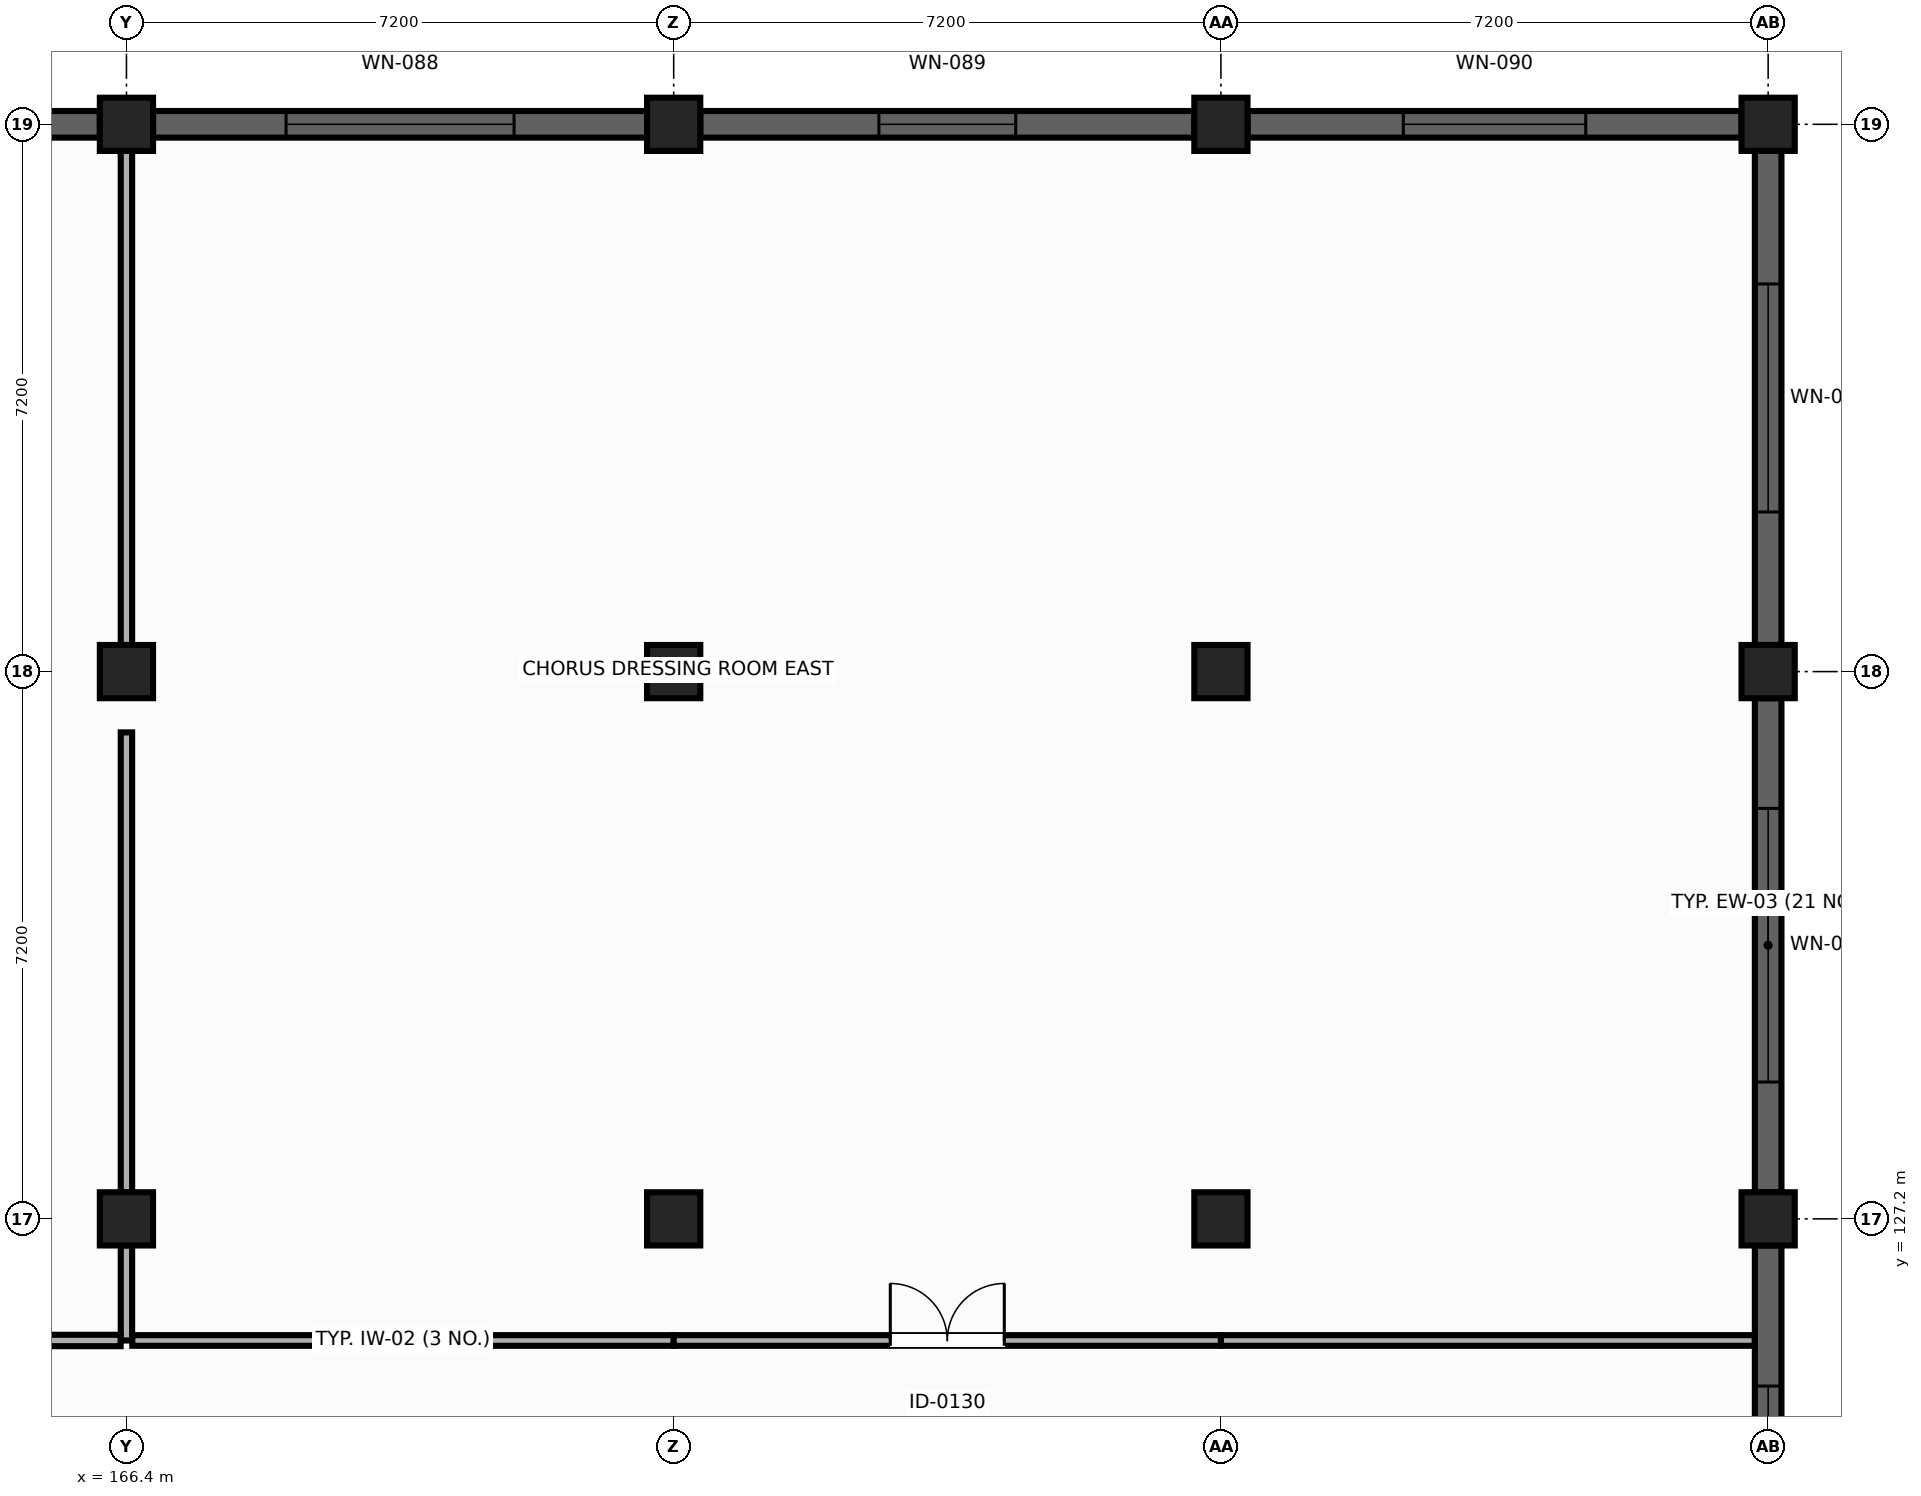
"""IFC4 building model, lengths in metres.
Left out: names, types, materials, properties, quantities, classifications, styles, units other than length and angle.
Written with IfcOpenShell. Run it as: python <this file> out.ifc"""

import sys

from ifc_helpers import new_model, si_unit, direction, frame, frame_2d, origin, origin_2d, place, context, subcontext, project, spatial, rectangle, extrude, element, fill, save


model = new_model("IFC4")
c1 = context("Model", 3, precision=1e-05, world=origin(), true_north=direction((0.0, 1.0)))
c2 = subcontext(c1, "Body", "Model", "MODEL_VIEW")
j1 = project(units=[si_unit("LENGTHUNIT", "METRE"), si_unit("PLANEANGLEUNIT", "RADIAN")], contexts=[c1])
p1 = place(None, origin())
s1 = spatial("IfcSite", under=j1, at=p1, CompositionType="ELEMENT")
p2 = place(p1, origin())
s2 = spatial("IfcBuilding", under=s1, at=p2, CompositionType="ELEMENT")
p3 = place(p2, frame((0.0, 0.0, 5.4)))
s3 = spatial("IfcBuildingStorey", under=s2, at=p3, CompositionType="ELEMENT", Elevation=5.4)
for number, where, z_axis, x_axis in (
    (1, (166.4, 127.2, 0.0), (0.0, 0.0, 1.0), (0.0, 1.0, 0.0)),
    (2, (173.6, 127.2, 0.0), (0.0, 0.0, 1.0), (1.0, 0.0, 0.0)),
    (3, (180.8, 127.2, 0.0), (0.0, 0.0, 1.0), (1.0, 0.0, 0.0)),
):
    element("IfcColumn", number, at=place(p3, frame(where, z_axis=z_axis, x_axis=x_axis)), inside=s3, PredefinedType="COLUMN", context=c2, shape_type="SweptSolid", body=[
        extrude(rectangle(XDim=0.7, YDim=0.7, at=origin_2d()), origin(), (0.0, 0.0, 1.0), 4.5),
    ])
p4 = place(p3, frame((188.0, 127.2, 0.0), z_axis=(0.0, 0.0, 1.0), x_axis=(0.0, 1.0, 0.0)))
e4 = element("IfcColumn", 4, at=p4, inside=s3, PredefinedType="COLUMN", context=c2, shape_type="SweptSolid", body=[
    extrude(rectangle(XDim=0.7, YDim=0.7, at=origin_2d()), origin(), (0.0, 0.0, 1.0), 4.346),
])
for number, where, z_axis, x_axis in (
    (5, (166.4, 134.4, 0.0), (0.0, 0.0, 1.0), (1.0, 0.0, 0.0)),
    (6, (173.6, 134.4, 0.0), (0.0, 0.0, 1.0), (1.0, 0.0, 0.0)),
    (7, (180.8, 134.4, 0.0), (0.0, 0.0, 1.0), (0.0, 1.0, 0.0)),
):
    element("IfcColumn", number, at=place(p3, frame(where, z_axis=z_axis, x_axis=x_axis)), inside=s3, PredefinedType="COLUMN", context=c2, shape_type="SweptSolid", body=[
        extrude(rectangle(XDim=0.7, YDim=0.7, at=origin_2d()), origin(), (0.0, 0.0, 1.0), 4.5),
    ])
p5 = place(p3, frame((188.0, 134.4, 0.0), z_axis=(0.0, 0.0, 1.0), x_axis=(1.0, 0.0, 0.0)))
e8 = element("IfcColumn", 8, at=p5, inside=s3, PredefinedType="COLUMN", context=c2, shape_type="SweptSolid", body=[
    extrude(rectangle(XDim=0.7, YDim=0.7, at=origin_2d()), origin(), (0.0, 0.0, 1.0), 4.346),
])
for number, where, z_axis, x_axis in (
    (9, (166.4, 141.6, 0.0), (0.0, 0.0, 1.0), (1.0, 0.0, 0.0)),
    (10, (173.6, 141.6, 0.0), (0.0, 0.0, 1.0), (0.0, 1.0, 0.0)),
    (11, (180.8, 141.6, 0.0), (0.0, 0.0, 1.0), (1.0, 0.0, 0.0)),
):
    element("IfcColumn", number, at=place(p3, frame(where, z_axis=z_axis, x_axis=x_axis)), inside=s3, PredefinedType="COLUMN", context=c2, shape_type="SweptSolid", body=[
        extrude(rectangle(XDim=0.7, YDim=0.7, at=origin_2d()), origin(), (0.0, 0.0, 1.0), 4.5),
    ])
p6 = place(p3, frame((188.0, 141.6, 0.0), z_axis=(0.0, 0.0, 1.0), x_axis=(0.0, 1.0, 0.0)))
e12 = element("IfcColumn", 12, at=p6, inside=s3, PredefinedType="COLUMN", context=c2, shape_type="SweptSolid", body=[
    extrude(rectangle(XDim=0.7, YDim=0.7, at=origin_2d()), origin(), (0.0, 0.0, 1.0), 4.346),
])
p7 = place(p3, frame((159.55, 141.6, 0.0), z_axis=(0.0, 0.0, 1.0), x_axis=(1.0, 0.0, 0.0)))
e13 = element("IfcWall", 13, at=p7, inside=s3, PredefinedType="SOLIDWALL", context=c2, shape_type="SweptSolid", body=[
    extrude(rectangle(XDim=6.5, YDim=0.35, at=frame_2d((3.25, 0.0))), origin(), (0.0, 0.0, 1.0), 4.22),
])
p8 = place(p3, frame((166.75, 141.6, 0.0), z_axis=(0.0, 0.0, 1.0), x_axis=(1.0, 0.0, 0.0)))
e14 = element("IfcWall", 14, at=p8, inside=s3, PredefinedType="SOLIDWALL", context=c2, shape_type="SweptSolid", body=[
    extrude(rectangle(XDim=6.5, YDim=0.35, at=frame_2d((3.25, 0.0))), origin(), (0.0, 0.0, 1.0), 4.22),
])
p9 = place(p8, frame((1.75, 0.0, 0.9)))
e15 = element("IfcOpeningElement", 15, at=p9, cuts=e14, PredefinedType="OPENING", context=c2, shape_type="SweptSolid", body=[
    extrude(rectangle(XDim=3.0, YDim=2.1, at=frame_2d((1.5, 1.05))), frame((0.0, 0.185, 0.0), z_axis=(0.0, -1.0, 0.0), x_axis=(1.0, 0.0, 0.0)), (0.0, 0.0, 1.0), 0.37),
])
p10 = place(p3, frame((173.95, 141.6, 0.0), z_axis=(0.0, 0.0, 1.0), x_axis=(1.0, 0.0, 0.0)))
e16 = element("IfcWall", 16, at=p10, inside=s3, PredefinedType="SOLIDWALL", context=c2, shape_type="SweptSolid", body=[
    extrude(rectangle(XDim=6.5, YDim=0.35, at=frame_2d((3.25, 0.0))), origin(), (0.0, 0.0, 1.0), 4.22),
])
p11 = place(p10, frame((2.35, 0.0, 1.8)))
e17 = element("IfcOpeningElement", 17, at=p11, cuts=e16, PredefinedType="OPENING", context=c2, shape_type="SweptSolid", body=[
    extrude(rectangle(XDim=1.8, YDim=1.2, at=frame_2d((0.9, 0.6))), frame((0.0, 0.185, 0.0), z_axis=(0.0, -1.0, 0.0), x_axis=(1.0, 0.0, 0.0)), (0.0, 0.0, 1.0), 0.37),
])
p12 = place(p3, frame((181.15, 141.6, 0.0), z_axis=(0.0, 0.0, 1.0), x_axis=(1.0, 0.0, 0.0)))
e18 = element("IfcWall", 18, at=p12, inside=s3, PredefinedType="SOLIDWALL", context=c2, shape_type="SweptSolid", body=[
    extrude(rectangle(XDim=6.5, YDim=0.35, at=frame_2d((3.25, 0.0))), origin(), (0.0, 0.0, 1.0), 4.5),
])
p13 = place(p12, frame((2.05, 0.0, 1.8)))
e19 = element("IfcOpeningElement", 19, at=p13, cuts=e18, PredefinedType="OPENING", context=c2, shape_type="SweptSolid", body=[
    extrude(rectangle(XDim=2.4, YDim=1.2, at=frame_2d((1.2, 0.6))), frame((0.0, 0.185, 0.0), z_axis=(0.0, -1.0, 0.0), x_axis=(1.0, 0.0, 0.0)), (0.0, 0.0, 1.0), 0.37),
])
p14 = place(p3, frame((188.0, 141.25, 0.0), z_axis=(0.0, 0.0, 1.0), x_axis=(0.0, -1.0, 0.0)))
e20 = element("IfcWall", 20, at=p14, inside=s3, PredefinedType="SOLIDWALL", context=c2, shape_type="SweptSolid", body=[
    extrude(rectangle(XDim=6.5, YDim=0.35, at=frame_2d((3.25, 0.0))), origin(), (0.0, 0.0, 1.0), 4.346),
])
p15 = place(p14, frame((1.75, 0.0, 1.8)))
e21 = element("IfcOpeningElement", 21, at=p15, cuts=e20, PredefinedType="OPENING", context=c2, shape_type="SweptSolid", body=[
    extrude(rectangle(XDim=3.0, YDim=1.2, at=frame_2d((1.5, 0.6))), frame((0.0, 0.185, 0.0), z_axis=(0.0, -1.0, 0.0), x_axis=(1.0, 0.0, 0.0)), (0.0, 0.0, 1.0), 0.37),
])
p16 = place(p3, frame((188.0, 134.05, 0.0), z_axis=(0.0, 0.0, 1.0), x_axis=(0.0, -1.0, 0.0)))
e22 = element("IfcWall", 22, at=p16, inside=s3, PredefinedType="SOLIDWALL", context=c2, shape_type="SweptSolid", body=[
    extrude(rectangle(XDim=6.5, YDim=0.35, at=frame_2d((3.25, 0.0))), origin(), (0.0, 0.0, 1.0), 4.346),
])
p17 = place(p16, frame((1.45, 0.0, 1.8)))
e23 = element("IfcOpeningElement", 23, at=p17, cuts=e22, PredefinedType="OPENING", context=c2, shape_type="SweptSolid", body=[
    extrude(rectangle(XDim=3.6, YDim=1.2, at=frame_2d((1.8, 0.6))), frame((0.0, 0.185, 0.0), z_axis=(0.0, -1.0, 0.0), x_axis=(1.0, 0.0, 0.0)), (0.0, 0.0, 1.0), 0.37),
])
p18 = place(p3, frame((188.0, 126.85, 0.0), z_axis=(0.0, 0.0, 1.0), x_axis=(0.0, -1.0, 0.0)))
e24 = element("IfcWall", 24, at=p18, inside=s3, PredefinedType="SOLIDWALL", context=c2, shape_type="SweptSolid", body=[
    extrude(rectangle(XDim=6.5, YDim=0.35, at=frame_2d((3.25, 0.0))), origin(), (0.0, 0.0, 1.0), 4.346),
])
p19 = place(p18, frame((1.85, 0.0, 0.9)))
e25 = element("IfcOpeningElement", 25, at=p19, cuts=e24, PredefinedType="OPENING", context=c2, shape_type="SweptSolid", body=[
    extrude(rectangle(XDim=1.6, YDim=2.4, at=frame_2d((0.8, 1.2))), frame((0.0, 0.185, 0.0), z_axis=(0.0, -1.0, 0.0), x_axis=(1.0, 0.0, 0.0)), (0.0, 0.0, 1.0), 0.37),
])
p20 = place(p3, frame((166.4, 127.55, 0.0), z_axis=(0.0, 0.0, 1.0), x_axis=(0.0, 1.0, 0.0)))
e26 = element("IfcWall", 26, at=p20, inside=s3, PredefinedType="PARTITIONING", context=c2, shape_type="SweptSolid", body=[
    extrude(rectangle(XDim=6.05, YDim=0.15, at=frame_2d((3.025, 0.0))), origin(), (0.0, 0.0, 1.0), 3.515),
])
p21 = place(p3, frame((166.4, 125.6, 0.0), z_axis=(0.0, 0.0, 1.0), x_axis=(0.0, 1.0, 0.0)))
e27 = element("IfcWall", 27, at=p21, inside=s3, PredefinedType="PARTITIONING", context=c2, shape_type="SweptSolid", body=[
    extrude(rectangle(XDim=1.25, YDim=0.15, at=frame_2d((0.625, 0.0))), origin(), (0.0, 0.0, 1.0), 3.515),
])
p22 = place(p3, frame((166.4, 134.75, 0.0), z_axis=(0.0, 0.0, 1.0), x_axis=(0.0, 1.0, 0.0)))
e28 = element("IfcWall", 28, at=p22, inside=s3, PredefinedType="PARTITIONING", context=c2, shape_type="SweptSolid", body=[
    extrude(rectangle(XDim=6.5, YDim=0.15, at=frame_2d((3.25, 0.0))), origin(), (0.0, 0.0, 1.0), 3.515),
])
p23 = place(p3, frame((159.2, 125.6, 0.0), z_axis=(0.0, 0.0, 1.0), x_axis=(1.0, 0.0, 0.0)))
e29 = element("IfcWall", 29, at=p23, inside=s3, PredefinedType="PARTITIONING", context=c2, shape_type="SweptSolid", body=[
    extrude(rectangle(XDim=7.123, YDim=0.15, at=frame_2d((3.562, 0.0))), origin(), (0.0, 0.0, 1.0), 3.515),
])
p24 = place(p3, frame((166.477, 125.6, 0.0), z_axis=(0.0, 0.0, 1.0), x_axis=(1.0, 0.0, 0.0)))
e30 = element("IfcWall", 30, at=p24, inside=s3, PredefinedType="PARTITIONING", context=c2, shape_type="SweptSolid", body=[
    extrude(rectangle(XDim=7.123, YDim=0.14, at=frame_2d((3.562, 0.0))), origin(), (0.0, 0.0, 1.0), 3.515),
])
p25 = place(p3, frame((173.6, 125.6, 0.0), z_axis=(0.0, 0.0, 1.0), x_axis=(1.0, 0.0, 0.0)))
e31 = element("IfcWall", 31, at=p25, inside=s3, PredefinedType="PARTITIONING", context=c2, shape_type="SweptSolid", body=[
    extrude(rectangle(XDim=7.2, YDim=0.14, at=frame_2d((3.6, 0.0))), origin(), (0.0, 0.0, 1.0), 3.515),
])
p26 = place(p25, frame((2.85, 0.0, 0.0)))
e32 = element("IfcOpeningElement", 32, at=p26, cuts=e31, PredefinedType="OPENING", context=c2, shape_type="SweptSolid", body=[
    extrude(rectangle(XDim=1.5, YDim=2.2, at=frame_2d((0.75, 1.1))), frame((0.0, 0.08, 0.0), z_axis=(0.0, -1.0, 0.0), x_axis=(1.0, 0.0, 0.0)), (0.0, 0.0, 1.0), 0.16),
])
p27 = place(p3, frame((180.8, 125.6, 0.0), z_axis=(0.0, 0.0, 1.0), x_axis=(1.0, 0.0, 0.0)))
e33 = element("IfcWall", 33, at=p27, inside=s3, PredefinedType="PARTITIONING", context=c2, shape_type="SweptSolid", body=[
    extrude(rectangle(XDim=7.023, YDim=0.14, at=frame_2d((3.511, 0.0))), origin(), (0.0, 0.0, 1.0), 3.515),
])
p28 = place(p9, origin())
e34 = element("IfcWindow", 34, at=p28, inside=s3, PartitioningType="SINGLE_PANEL", PredefinedType="WINDOW", context=c2, shape_type="SweptSolid", body=[
    extrude(rectangle(XDim=3.0, YDim=2.1, at=frame_2d((1.5, 1.05))), frame((0.0, 0.03, 0.0), z_axis=(0.0, -1.0, 0.0), x_axis=(1.0, 0.0, 0.0)), (0.0, 0.0, 1.0), 0.06),
])
fill(e15, e34)
p29 = place(p11, origin())
e35 = element("IfcWindow", 35, at=p29, inside=s3, PartitioningType="SINGLE_PANEL", PredefinedType="WINDOW", context=c2, shape_type="SweptSolid", body=[
    extrude(rectangle(XDim=1.8, YDim=1.2, at=frame_2d((0.9, 0.6))), frame((0.0, 0.03, 0.0), z_axis=(0.0, -1.0, 0.0), x_axis=(1.0, 0.0, 0.0)), (0.0, 0.0, 1.0), 0.06),
])
fill(e17, e35)
p30 = place(p13, origin())
e36 = element("IfcWindow", 36, at=p30, inside=s3, PartitioningType="SINGLE_PANEL", PredefinedType="WINDOW", context=c2, shape_type="SweptSolid", body=[
    extrude(rectangle(XDim=2.4, YDim=1.2, at=frame_2d((1.2, 0.6))), frame((0.0, 0.03, 0.0), z_axis=(0.0, -1.0, 0.0), x_axis=(1.0, 0.0, 0.0)), (0.0, 0.0, 1.0), 0.06),
])
fill(e19, e36)
p31 = place(p15, origin())
e37 = element("IfcWindow", 37, at=p31, inside=s3, PartitioningType="SINGLE_PANEL", PredefinedType="WINDOW", context=c2, shape_type="SweptSolid", body=[
    extrude(rectangle(XDim=3.0, YDim=1.2, at=frame_2d((1.5, 0.6))), frame((0.0, 0.03, 0.0), z_axis=(0.0, -1.0, 0.0), x_axis=(1.0, 0.0, 0.0)), (0.0, 0.0, 1.0), 0.06),
])
fill(e21, e37)
p32 = place(p17, origin())
e38 = element("IfcWindow", 38, at=p32, inside=s3, PartitioningType="SINGLE_PANEL", PredefinedType="WINDOW", context=c2, shape_type="SweptSolid", body=[
    extrude(rectangle(XDim=3.6, YDim=1.2, at=frame_2d((1.8, 0.6))), frame((0.0, 0.03, 0.0), z_axis=(0.0, -1.0, 0.0), x_axis=(1.0, 0.0, 0.0)), (0.0, 0.0, 1.0), 0.06),
])
fill(e23, e38)
p33 = place(p19, origin())
e39 = element("IfcWindow", 39, at=p33, inside=s3, PartitioningType="SINGLE_PANEL", PredefinedType="WINDOW", context=c2, shape_type="SweptSolid", body=[
    extrude(rectangle(XDim=1.6, YDim=2.4, at=frame_2d((0.8, 1.2))), frame((0.0, 0.03, 0.0), z_axis=(0.0, -1.0, 0.0), x_axis=(1.0, 0.0, 0.0)), (0.0, 0.0, 1.0), 0.06),
])
fill(e25, e39)
p34 = place(p26, origin())
e40 = element("IfcDoor", 40, at=p34, inside=s3, OperationType="DOUBLE_DOOR_SINGLE_SWING", PredefinedType="DOOR", context=c2, shape_type="SweptSolid", body=[
    extrude(rectangle(XDim=1.5, YDim=2.2, at=frame_2d((0.75, 1.1))), frame((0.0, 0.025, 0.0), z_axis=(0.0, -1.0, 0.0), x_axis=(1.0, 0.0, 0.0)), (0.0, 0.0, 1.0), 0.05),
])
fill(e32, e40)
save(model, sys.argv[1])
